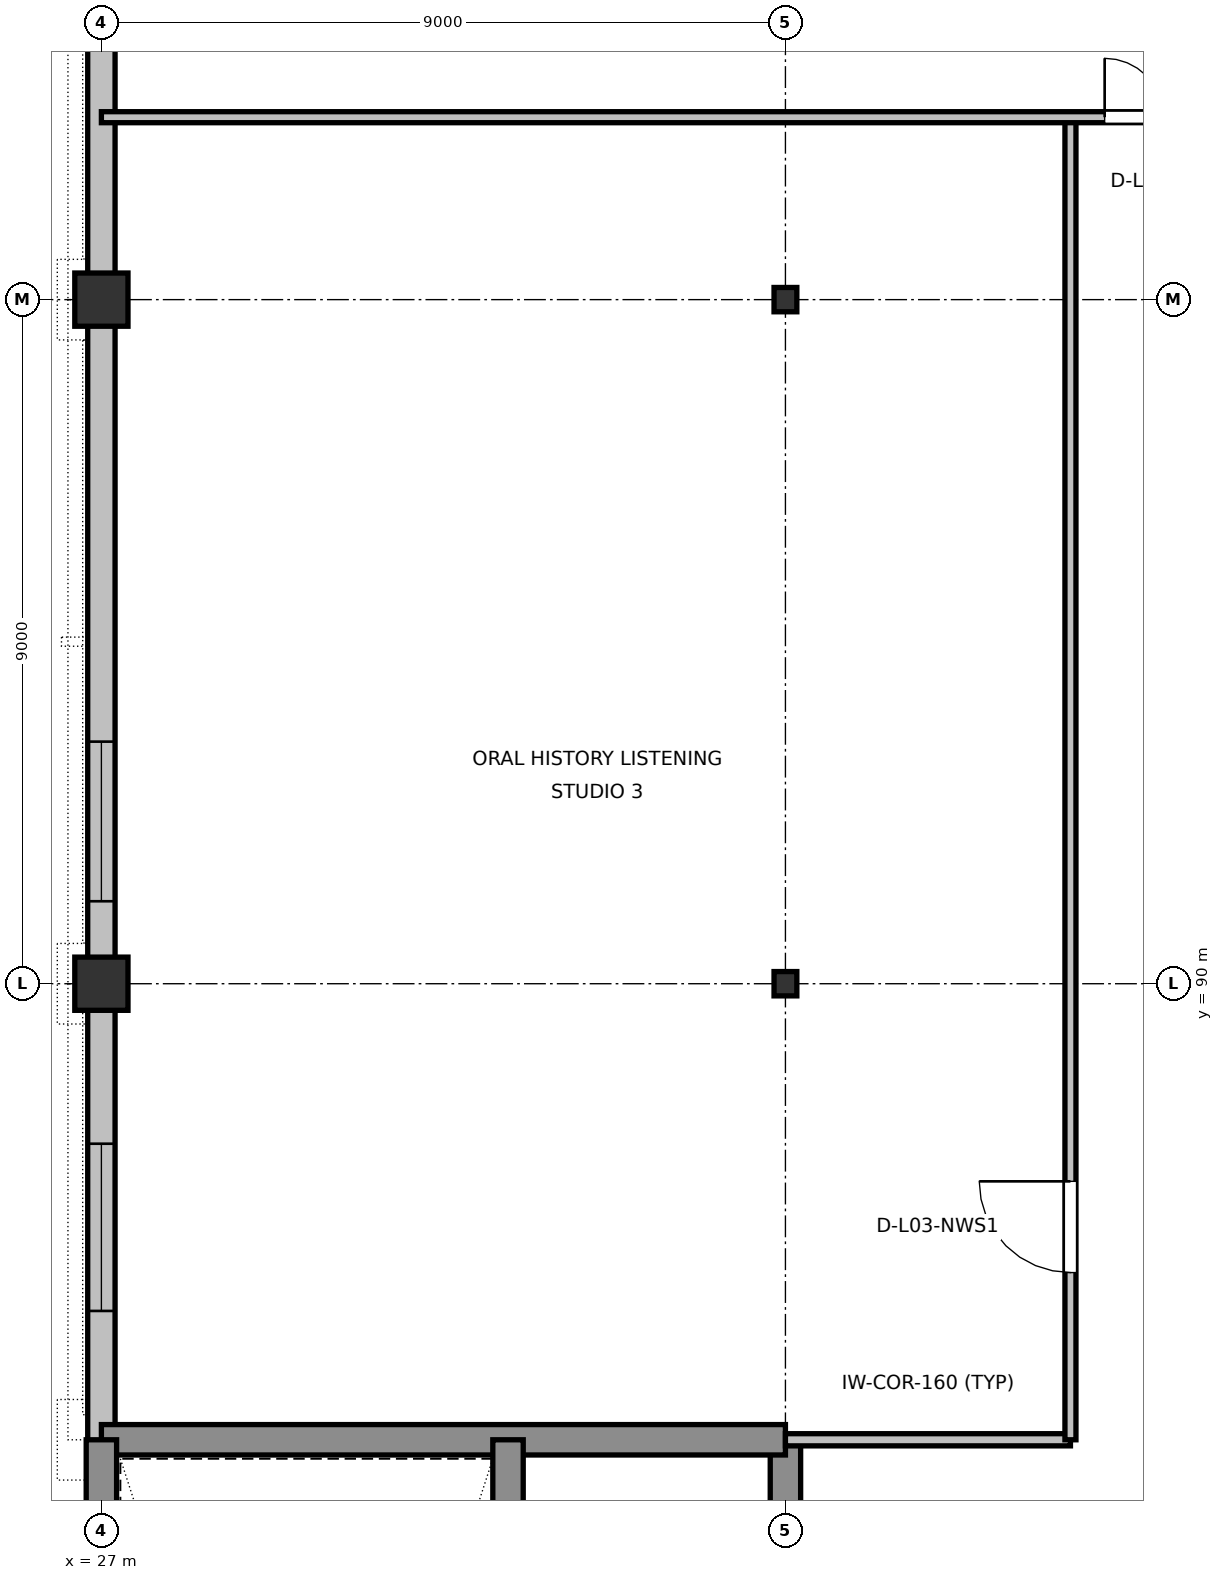
"""IFC4 building model, lengths in metres.
Left out: names, types, materials, properties, quantities, classifications, styles, units other than length and angle.
Written with IfcOpenShell. Run it as: python <this file> out.ifc"""

import sys

from ifc_helpers import new_model, si_unit, direction, frame, frame_2d, origin, origin_2d, place, context, subcontext, project, spatial, rectangle, i_section, extrude, element, fill, save


model = new_model("IFC4")
c1 = context("Model", 3, precision=1e-05, world=origin(), true_north=direction((0.0, 1.0)))
c2 = subcontext(c1, "Body", "Model", "MODEL_VIEW")
j1 = project(units=[si_unit("LENGTHUNIT", "METRE"), si_unit("PLANEANGLEUNIT", "RADIAN")], contexts=[c1])
p1 = place(None, origin())
s1 = spatial("IfcSite", under=j1, at=p1, CompositionType="ELEMENT")
p2 = place(p1, origin())
s2 = spatial("IfcBuilding", under=s1, at=p2, CompositionType="ELEMENT")
p3 = place(p2, frame((0.0, 0.0, 15.0)))
s3 = spatial("IfcBuildingStorey", under=s2, at=p3, CompositionType="ELEMENT", Elevation=15.0)
for number, where, z_axis, x_axis in (
    (1, (27.0, 90.0, 0.0), (0.0, 0.0, 1.0), (1.0, 0.0, 0.0)),
    (2, (27.0, 99.0, 0.0), (0.0, 0.0, 1.0), (1.0, 0.0, 0.0)),
):
    element("IfcColumn", number, at=place(p3, frame(where, z_axis=z_axis, x_axis=x_axis)), inside=s3, PredefinedType="COLUMN", context=c2, shape_type="SweptSolid", body=[
        extrude(rectangle(XDim=0.7, YDim=0.7, at=origin_2d()), origin(), (0.0, 0.0, 1.0), 4.2),
    ])
for number, where, z_axis, x_axis in (
    (3, (36.0, 90.0, 0.0), (0.0, 0.0, 1.0), (1.0, 0.0, 0.0)),
    (4, (36.0, 99.0, 0.0), (0.0, 0.0, 1.0), (1.0, 0.0, 0.0)),
):
    element("IfcColumn", number, at=place(p3, frame(where, z_axis=z_axis, x_axis=x_axis)), inside=s3, PredefinedType="COLUMN", context=c2, shape_type="SweptSolid", body=[
        extrude(i_section(OverallWidth=0.3, OverallDepth=0.32, WebThickness=0.011, FlangeThickness=0.021, at=origin_2d()), origin(), (0.0, 0.0, 1.0), 4.2),
    ])
p4 = place(p3, frame((27.0, 89.665, 0.0), z_axis=(0.0, 0.0, 1.0), x_axis=(0.0, -1.0, 0.0)))
e5 = element("IfcWall", 5, at=p4, inside=s3, PredefinedType="STANDARD", context=c2, shape_type="SweptSolid", body=[
    extrude(rectangle(XDim=5.74, YDim=0.36, at=frame_2d((2.87, 0.0))), origin(), (0.0, 0.0, 1.0), 3.635),
])
p5 = place(p4, frame((1.77, 0.0, 0.9)))
e6 = element("IfcOpeningElement", 6, at=p5, cuts=e5, PredefinedType="OPENING", context=c2, shape_type="SweptSolid", body=[
    extrude(rectangle(XDim=2.2, YDim=2.3, at=frame_2d((1.1, 1.15))), frame((0.0, 0.19, 0.0), z_axis=(0.0, -1.0, 0.0), x_axis=(1.0, 0.0, 0.0)), (0.0, 0.0, 1.0), 0.38),
])
p6 = place(p3, frame((27.0, 98.665, 0.0), z_axis=(0.0, 0.0, 1.0), x_axis=(0.0, -1.0, 0.0)))
e7 = element("IfcWall", 7, at=p6, inside=s3, PredefinedType="STANDARD", context=c2, shape_type="SweptSolid", body=[
    extrude(rectangle(XDim=8.33, YDim=0.36, at=frame_2d((4.165, 0.0))), origin(), (0.0, 0.0, 1.0), 3.635),
])
p7 = place(p6, frame((5.48, 0.0, 0.9)))
e8 = element("IfcOpeningElement", 8, at=p7, cuts=e7, PredefinedType="OPENING", context=c2, shape_type="SweptSolid", body=[
    extrude(rectangle(XDim=2.1, YDim=2.25, at=frame_2d((1.05, 1.125))), frame((0.0, 0.19, 0.0), z_axis=(0.0, -1.0, 0.0), x_axis=(1.0, 0.0, 0.0)), (0.0, 0.0, 1.0), 0.38),
])
p8 = place(p3, frame((27.0, 107.665, 0.0), z_axis=(0.0, 0.0, 1.0), x_axis=(0.0, -1.0, 0.0)))
e9 = element("IfcWall", 9, at=p8, inside=s3, PredefinedType="STANDARD", context=c2, shape_type="SweptSolid", body=[
    extrude(rectangle(XDim=8.33, YDim=0.36, at=frame_2d((4.165, 0.0))), origin(), (0.0, 0.0, 1.0), 3.635),
])
p9 = place(p8, frame((0.75, 0.0, 0.9)))
e10 = element("IfcOpeningElement", 10, at=p9, cuts=e9, PredefinedType="OPENING", context=c2, shape_type="SweptSolid", body=[
    extrude(rectangle(XDim=2.0, YDim=2.2, at=frame_2d((1.0, 1.1))), frame((0.0, 0.19, 0.0), z_axis=(0.0, -1.0, 0.0), x_axis=(1.0, 0.0, 0.0)), (0.0, 0.0, 1.0), 0.38),
])
p10 = place(p3, frame((36.0, 66.0, 0.0), z_axis=(0.0, 0.0, 1.0), x_axis=(0.0, 1.0, 0.0)))
e11 = element("IfcWall", 11, at=p10, inside=s3, PredefinedType="SHEAR", context=c2, shape_type="SweptSolid", body=[
    extrude(rectangle(XDim=18.0, YDim=0.4, at=frame_2d((9.0, 0.0))), origin(), (0.0, 0.0, 1.0), 3.96),
])
p11 = place(p10, frame((0.8, 0.0, 0.0)))
e12 = element("IfcOpeningElement", 12, at=p11, cuts=e11, PredefinedType="OPENING", context=c2, shape_type="SweptSolid", body=[
    extrude(rectangle(XDim=1.1, YDim=2.16, at=frame_2d((0.55, 1.08))), frame((0.0, 0.21, 0.0), z_axis=(0.0, -1.0, 0.0), x_axis=(1.0, 0.0, 0.0)), (0.0, 0.0, 1.0), 0.42),
])
p12 = place(p10, frame((3.2, 0.0, 0.0)))
e13 = element("IfcOpeningElement", 13, at=p12, cuts=e11, PredefinedType="OPENING", context=c2, shape_type="SweptSolid", body=[
    extrude(rectangle(XDim=1.2, YDim=2.2, at=frame_2d((0.6, 1.1))), frame((0.0, 0.21, 0.0), z_axis=(0.0, -1.0, 0.0), x_axis=(1.0, 0.0, 0.0)), (0.0, 0.0, 1.0), 0.42),
])
p13 = place(p10, frame((6.8, 0.0, 0.0)))
e14 = element("IfcOpeningElement", 14, at=p13, cuts=e11, PredefinedType="OPENING", context=c2, shape_type="SweptSolid", body=[
    extrude(rectangle(XDim=0.85, YDim=2.1, at=frame_2d((0.425, 1.05))), frame((0.0, 0.21, 0.0), z_axis=(0.0, -1.0, 0.0), x_axis=(1.0, 0.0, 0.0)), (0.0, 0.0, 1.0), 0.42),
])
p14 = place(p3, frame((36.0, 84.0, 0.0), z_axis=(0.0, 0.0, 1.0), x_axis=(-1.0, 0.0, 0.0)))
e15 = element("IfcWall", 15, at=p14, inside=s3, PredefinedType="SHEAR", context=c2, shape_type="SweptSolid", body=[
    extrude(rectangle(XDim=9.0, YDim=0.4, at=frame_2d((4.5, 0.0))), origin(), (0.0, 0.0, 1.0), 3.96),
])
p15 = place(p3, frame((27.0, 84.0, 0.0), z_axis=(0.0, 0.0, 1.0), x_axis=(0.0, -1.0, 0.0)))
e16 = element("IfcWall", 16, at=p15, inside=s3, PredefinedType="SHEAR", context=c2, shape_type="SweptSolid", body=[
    extrude(rectangle(XDim=18.0, YDim=0.4, at=frame_2d((9.0, 0.0))), origin(), (0.0, 0.0, 1.0), 3.96),
])
p16 = place(p3, frame((32.35, 66.0, 0.0), z_axis=(0.0, 0.0, 1.0), x_axis=(0.0, 1.0, 0.0)))
e17 = element("IfcWall", 17, at=p16, inside=s3, PredefinedType="SHEAR", context=c2, shape_type="SweptSolid", body=[
    extrude(rectangle(XDim=18.0, YDim=0.4, at=frame_2d((9.0, 0.0))), origin(), (0.0, 0.0, 1.0), 3.96),
])
p17 = place(p16, frame((0.7, 0.0, 0.0)))
e18 = element("IfcOpeningElement", 18, at=p17, cuts=e17, PredefinedType="OPENING", context=c2, shape_type="SweptSolid", body=[
    extrude(rectangle(XDim=1.1, YDim=2.16, at=frame_2d((0.55, 1.08))), frame((0.0, 0.21, 0.0), z_axis=(0.0, -1.0, 0.0), x_axis=(1.0, 0.0, 0.0)), (0.0, 0.0, 1.0), 0.42),
])
p18 = place(p3, frame((36.0, 84.0, 0.0), z_axis=(0.0, 0.0, 1.0), x_axis=(1.0, 0.0, 0.0)))
e19 = element("IfcWall", 19, at=p18, inside=s3, PredefinedType="PARTITIONING", context=c2, shape_type="SweptSolid", body=[
    extrude(rectangle(XDim=3.75, YDim=0.16, at=frame_2d((1.875, 0.0))), origin(), (0.0, 0.0, 1.0), 3.645),
])
p19 = place(p3, frame((39.75, 84.0, 0.0), z_axis=(0.0, 0.0, 1.0), x_axis=(0.0, 1.0, 0.0)))
e20 = element("IfcWall", 20, at=p19, inside=s3, PredefinedType="PARTITIONING", context=c2, shape_type="SweptSolid", body=[
    extrude(rectangle(XDim=17.4, YDim=0.145, at=frame_2d((8.7, 0.0))), origin(), (0.0, 0.0, 1.0), 3.96),
])
p20 = place(p19, frame((2.2, 0.0, 0.0)))
e21 = element("IfcOpeningElement", 21, at=p20, cuts=e20, PredefinedType="OPENING", context=c2, shape_type="SweptSolid", body=[
    extrude(rectangle(XDim=1.2, YDim=2.18, at=frame_2d((0.6, 1.09))), frame((0.0, 0.083, 0.0), z_axis=(0.0, -1.0, 0.0), x_axis=(1.0, 0.0, 0.0)), (0.0, 0.0, 1.0), 0.165),
])
p21 = place(p3, frame((27.0, 101.4, 0.0), z_axis=(0.0, 0.0, 1.0), x_axis=(1.0, 0.0, 0.0)))
e22 = element("IfcWall", 22, at=p21, inside=s3, PredefinedType="PARTITIONING", context=c2, shape_type="SweptSolid", body=[
    extrude(rectangle(XDim=54.0, YDim=0.145, at=frame_2d((27.0, 0.0))), origin(), (0.0, 0.0, 1.0), 3.96),
])
p22 = place(p21, frame((13.2, 0.0, 0.0)))
e23 = element("IfcOpeningElement", 23, at=p22, cuts=e22, PredefinedType="OPENING", context=c2, shape_type="SweptSolid", body=[
    extrude(rectangle(XDim=1.55, YDim=2.24, at=frame_2d((0.775, 1.12))), frame((0.0, 0.083, 0.0), z_axis=(0.0, -1.0, 0.0), x_axis=(1.0, 0.0, 0.0)), (0.0, 0.0, 1.0), 0.165),
])
p23 = place(p21, frame((28.8, 0.0, 0.0)))
e24 = element("IfcOpeningElement", 24, at=p23, cuts=e22, PredefinedType="OPENING", context=c2, shape_type="SweptSolid", body=[
    extrude(rectangle(XDim=1.55, YDim=2.24, at=frame_2d((0.775, 1.12))), frame((0.0, 0.083, 0.0), z_axis=(0.0, -1.0, 0.0), x_axis=(1.0, 0.0, 0.0)), (0.0, 0.0, 1.0), 0.165),
])
p24 = place(p5, origin())
e25 = element("IfcWindow", 25, at=p24, inside=s3, PartitioningType="SINGLE_PANEL", PredefinedType="WINDOW", context=c2, shape_type="SweptSolid", body=[
    extrude(rectangle(XDim=2.2, YDim=2.3, at=frame_2d((1.1, 1.15))), frame((0.0, 0.03, 0.0), z_axis=(0.0, -1.0, 0.0), x_axis=(1.0, 0.0, 0.0)), (0.0, 0.0, 1.0), 0.06),
])
fill(e6, e25)
p25 = place(p7, origin())
e26 = element("IfcWindow", 26, at=p25, inside=s3, PartitioningType="SINGLE_PANEL", PredefinedType="WINDOW", context=c2, shape_type="SweptSolid", body=[
    extrude(rectangle(XDim=2.1, YDim=2.25, at=frame_2d((1.05, 1.125))), frame((0.0, 0.03, 0.0), z_axis=(0.0, -1.0, 0.0), x_axis=(1.0, 0.0, 0.0)), (0.0, 0.0, 1.0), 0.06),
])
fill(e8, e26)
p26 = place(p20, origin())
e27 = element("IfcDoor", 27, at=p26, inside=s3, OperationType="SINGLE_SWING_RIGHT", PredefinedType="DOOR", context=c2, shape_type="SweptSolid", body=[
    extrude(rectangle(XDim=1.2, YDim=2.18, at=frame_2d((0.6, 1.09))), frame((0.0, 0.025, 0.0), z_axis=(0.0, -1.0, 0.0), x_axis=(1.0, 0.0, 0.0)), (0.0, 0.0, 1.0), 0.05),
])
fill(e21, e27)
p27 = place(p22, origin())
e28 = element("IfcDoor", 28, at=p27, inside=s3, OperationType="DOUBLE_DOOR_SINGLE_SWING", PredefinedType="DOOR", context=c2, shape_type="SweptSolid", body=[
    extrude(rectangle(XDim=1.55, YDim=2.24, at=frame_2d((0.775, 1.12))), frame((0.0, 0.025, 0.0), z_axis=(0.0, -1.0, 0.0), x_axis=(1.0, 0.0, 0.0)), (0.0, 0.0, 1.0), 0.05),
])
fill(e23, e28)
save(model, sys.argv[1])
